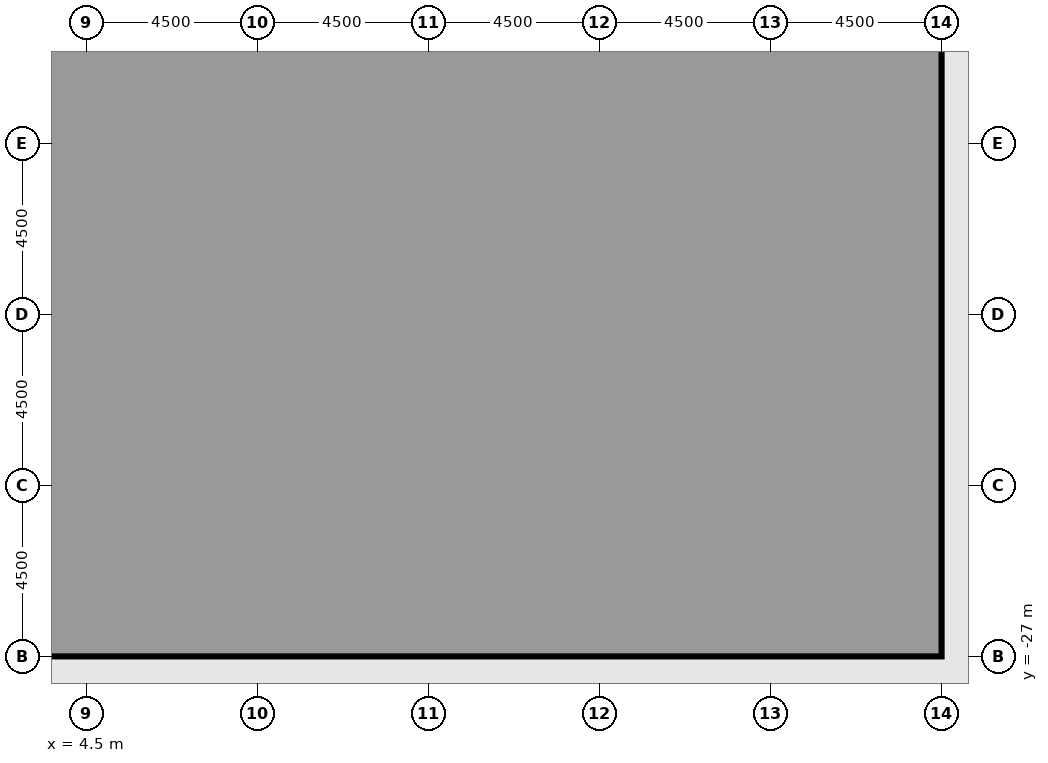
"""IFC4 building model, lengths in metres.
Left out: names, types, materials, properties, quantities, classifications, styles, units other than length and angle.
Written with IfcOpenShell. Run it as: python <this file> out.ifc"""

import sys

from ifc_helpers import new_model, si_unit, direction, frame, frame_2d, origin, origin_2d, place, context, subcontext, project, spatial, rectangle, extrude, element, fill, save


model = new_model("IFC4")
c1 = context("Model", 3, precision=1e-05, world=origin(), true_north=direction((0.0, 1.0)))
c2 = subcontext(c1, "Body", "Model", "MODEL_VIEW")
j1 = project(units=[si_unit("LENGTHUNIT", "METRE"), si_unit("PLANEANGLEUNIT", "RADIAN")], contexts=[c1])
p1 = place(None, origin())
s1 = spatial("IfcSite", under=j1, at=p1, CompositionType="ELEMENT")
p2 = place(p1, origin())
s2 = spatial("IfcBuilding", under=s1, at=p2, CompositionType="ELEMENT")
p3 = place(p2, frame((0.0, 0.0, 7.2)))
s3 = spatial("IfcBuildingStorey", under=s2, at=p3, CompositionType="ELEMENT", Elevation=7.2)
for number, where, z_axis, x_axis in (
    (1, (4.5, -27.0, -0.45), (0.0, 0.0, 1.0), (1.0, 0.0, 0.0)),
    (2, (9.0, -27.0, -0.45), (0.0, 0.0, 1.0), (1.0, 0.0, 0.0)),
    (3, (13.5, -27.0, -0.45), (0.0, 0.0, 1.0), (1.0, 0.0, 0.0)),
    (4, (18.0, -27.0, -0.45), (0.0, 0.0, 1.0), (1.0, 0.0, 0.0)),
    (5, (22.5, -27.0, -0.45), (0.0, 0.0, 1.0), (1.0, 0.0, 0.0)),
    (6, (27.0, -22.5, -0.45), (0.0, 0.0, 1.0), (1.0, 0.0, 0.0)),
    (7, (27.0, -18.0, -0.45), (0.0, 0.0, 1.0), (1.0, 0.0, 0.0)),
    (8, (27.0, -13.5, -0.45), (0.0, 0.0, 1.0), (1.0, 0.0, 0.0)),
):
    element("IfcColumn", number, at=place(p3, frame(where, z_axis=z_axis, x_axis=x_axis)), inside=s3, PredefinedType="COLUMN", context=c2, shape_type="SweptSolid", body=[
        extrude(rectangle(XDim=1.4, YDim=1.4, at=origin_2d()), origin(), (0.0, 0.0, 1.0), 4.55),
    ])
for number, where, z_axis, x_axis in (
    (9, (9.0, -18.0, 0.0), (0.0, 0.0, 1.0), (1.0, 0.0, 0.0)),
    (10, (18.0, -18.0, 0.0), (0.0, 0.0, 1.0), (1.0, 0.0, 0.0)),
    (11, (22.5, -18.0, 0.0), (0.0, 0.0, 1.0), (1.0, 0.0, 0.0)),
):
    element("IfcColumn", number, at=place(p3, frame(where, z_axis=z_axis, x_axis=x_axis)), inside=s3, PredefinedType="COLUMN", context=c2, shape_type="SweptSolid", body=[
        extrude(rectangle(XDim=1.6, YDim=1.6, at=origin_2d()), origin(), (0.0, 0.0, 1.0), 4.1),
    ])
p4 = place(p3, frame((3.8, -27.0, 0.0), z_axis=(0.0, 0.0, 1.0), x_axis=(-1.0, 0.0, 0.0)))
e12 = element("IfcWall", 12, at=p4, inside=s3, PredefinedType="SOLIDWALL", context=c2, shape_type="SweptSolid", body=[
    extrude(rectangle(XDim=3.1, YDim=0.3, at=frame_2d((1.55, 0.0))), origin(), (0.0, 0.0, 1.0), 2.75),
])
p5 = place(p4, frame((0.35, 0.0, 0.8)))
e13 = element("IfcOpeningElement", 13, at=p5, cuts=e12, PredefinedType="OPENING", context=c2, shape_type="SweptSolid", body=[
    extrude(rectangle(XDim=2.4, YDim=1.7, at=frame_2d((1.2, 0.85))), frame((0.0, 0.16, 0.0), z_axis=(0.0, -1.0, 0.0), x_axis=(1.0, 0.0, 0.0)), (0.0, 0.0, 1.0), 0.32),
])
p6 = place(p3, frame((8.3, -27.0, 0.0), z_axis=(0.0, 0.0, 1.0), x_axis=(-1.0, 0.0, 0.0)))
e14 = element("IfcWall", 14, at=p6, inside=s3, PredefinedType="SOLIDWALL", context=c2, shape_type="SweptSolid", body=[
    extrude(rectangle(XDim=3.1, YDim=0.3, at=frame_2d((1.55, 0.0))), origin(), (0.0, 0.0, 1.0), 2.75),
])
p7 = place(p6, frame((0.35, 0.0, 0.8)))
e15 = element("IfcOpeningElement", 15, at=p7, cuts=e14, PredefinedType="OPENING", context=c2, shape_type="SweptSolid", body=[
    extrude(rectangle(XDim=2.4, YDim=1.7, at=frame_2d((1.2, 0.85))), frame((0.0, 0.16, 0.0), z_axis=(0.0, -1.0, 0.0), x_axis=(1.0, 0.0, 0.0)), (0.0, 0.0, 1.0), 0.32),
])
p8 = place(p3, frame((12.8, -27.0, 0.0), z_axis=(0.0, 0.0, 1.0), x_axis=(-1.0, 0.0, 0.0)))
e16 = element("IfcWall", 16, at=p8, inside=s3, PredefinedType="SOLIDWALL", context=c2, shape_type="SweptSolid", body=[
    extrude(rectangle(XDim=3.1, YDim=0.3, at=frame_2d((1.55, 0.0))), origin(), (0.0, 0.0, 1.0), 2.75),
])
p9 = place(p8, frame((0.35, 0.0, 0.8)))
e17 = element("IfcOpeningElement", 17, at=p9, cuts=e16, PredefinedType="OPENING", context=c2, shape_type="SweptSolid", body=[
    extrude(rectangle(XDim=2.4, YDim=1.7, at=frame_2d((1.2, 0.85))), frame((0.0, 0.16, 0.0), z_axis=(0.0, -1.0, 0.0), x_axis=(1.0, 0.0, 0.0)), (0.0, 0.0, 1.0), 0.32),
])
p10 = place(p3, frame((17.3, -27.0, 0.0), z_axis=(0.0, 0.0, 1.0), x_axis=(-1.0, 0.0, 0.0)))
e18 = element("IfcWall", 18, at=p10, inside=s3, PredefinedType="SOLIDWALL", context=c2, shape_type="SweptSolid", body=[
    extrude(rectangle(XDim=3.1, YDim=0.3, at=frame_2d((1.55, 0.0))), origin(), (0.0, 0.0, 1.0), 2.75),
])
p11 = place(p10, frame((1.05, 0.0, 0.0)))
e19 = element("IfcOpeningElement", 19, at=p11, cuts=e18, PredefinedType="OPENING", context=c2, shape_type="SweptSolid", body=[
    extrude(rectangle(XDim=1.0, YDim=2.2, at=frame_2d((0.5, 1.1))), frame((0.0, 0.16, 0.0), z_axis=(0.0, -1.0, 0.0), x_axis=(1.0, 0.0, 0.0)), (0.0, 0.0, 1.0), 0.32),
])
p12 = place(p3, frame((21.8, -27.0, 0.0), z_axis=(0.0, 0.0, 1.0), x_axis=(-1.0, 0.0, 0.0)))
e20 = element("IfcWall", 20, at=p12, inside=s3, PredefinedType="SOLIDWALL", context=c2, shape_type="SweptSolid", body=[
    extrude(rectangle(XDim=3.1, YDim=0.3, at=frame_2d((1.55, 0.0))), origin(), (0.0, 0.0, 1.0), 2.75),
])
p13 = place(p12, frame((0.35, 0.0, 0.8)))
e21 = element("IfcOpeningElement", 21, at=p13, cuts=e20, PredefinedType="OPENING", context=c2, shape_type="SweptSolid", body=[
    extrude(rectangle(XDim=2.4, YDim=1.7, at=frame_2d((1.2, 0.85))), frame((0.0, 0.16, 0.0), z_axis=(0.0, -1.0, 0.0), x_axis=(1.0, 0.0, 0.0)), (0.0, 0.0, 1.0), 0.32),
])
p14 = place(p3, frame((26.406, -23.094, 0.0), z_axis=(0.0, 0.0, 1.0), x_axis=(-0.707106781187, -0.707106781187, 0.0)))
e22 = element("IfcWall", 22, at=p14, inside=s3, PredefinedType="SOLIDWALL", context=c2, shape_type="SweptSolid", body=[
    extrude(rectangle(XDim=4.684, YDim=0.3, at=frame_2d((2.342, 0.0))), origin(), (0.0, 0.0, 1.0), 2.75),
])
p15 = place(p14, frame((1.142, 0.0, 0.8)))
e23 = element("IfcOpeningElement", 23, at=p15, cuts=e22, PredefinedType="OPENING", context=c2, shape_type="SweptSolid", body=[
    extrude(rectangle(XDim=2.4, YDim=1.7, at=frame_2d((1.2, 0.85))), frame((0.0, 0.16, 0.0), z_axis=(0.0, -1.0, 0.0), x_axis=(1.0, 0.0, 0.0)), (0.0, 0.0, 1.0), 0.32),
])
p16 = place(p3, frame((27.0, -18.7, 0.0), z_axis=(0.0, 0.0, 1.0), x_axis=(0.0, -1.0, 0.0)))
e24 = element("IfcWall", 24, at=p16, inside=s3, PredefinedType="SOLIDWALL", context=c2, shape_type="SweptSolid", body=[
    extrude(rectangle(XDim=3.1, YDim=0.3, at=frame_2d((1.55, 0.0))), origin(), (0.0, 0.0, 1.0), 2.75),
])
p17 = place(p16, frame((0.35, 0.0, 0.8)))
e25 = element("IfcOpeningElement", 25, at=p17, cuts=e24, PredefinedType="OPENING", context=c2, shape_type="SweptSolid", body=[
    extrude(rectangle(XDim=2.4, YDim=1.7, at=frame_2d((1.2, 0.85))), frame((0.0, 0.16, 0.0), z_axis=(0.0, -1.0, 0.0), x_axis=(1.0, 0.0, 0.0)), (0.0, 0.0, 1.0), 0.32),
])
p18 = place(p3, frame((27.0, -14.2, 0.0), z_axis=(0.0, 0.0, 1.0), x_axis=(0.0, -1.0, 0.0)))
e26 = element("IfcWall", 26, at=p18, inside=s3, PredefinedType="SOLIDWALL", context=c2, shape_type="SweptSolid", body=[
    extrude(rectangle(XDim=3.1, YDim=0.3, at=frame_2d((1.55, 0.0))), origin(), (0.0, 0.0, 1.0), 2.75),
])
p19 = place(p18, frame((1.05, 0.0, 0.0)))
e27 = element("IfcOpeningElement", 27, at=p19, cuts=e26, PredefinedType="OPENING", context=c2, shape_type="SweptSolid", body=[
    extrude(rectangle(XDim=1.0, YDim=2.2, at=frame_2d((0.5, 1.1))), frame((0.0, 0.16, 0.0), z_axis=(0.0, -1.0, 0.0), x_axis=(1.0, 0.0, 0.0)), (0.0, 0.0, 1.0), 0.32),
])
p20 = place(p3, frame((27.0, -9.7, 0.0), z_axis=(0.0, 0.0, 1.0), x_axis=(0.0, -1.0, 0.0)))
e28 = element("IfcWall", 28, at=p20, inside=s3, PredefinedType="SOLIDWALL", context=c2, shape_type="SweptSolid", body=[
    extrude(rectangle(XDim=3.1, YDim=0.3, at=frame_2d((1.55, 0.0))), origin(), (0.0, 0.0, 1.0), 2.75),
])
p21 = place(p20, frame((0.475, 0.0, 0.8)))
e29 = element("IfcOpeningElement", 29, at=p21, cuts=e28, PredefinedType="OPENING", context=c2, shape_type="SweptSolid", body=[
    extrude(rectangle(XDim=1.2, YDim=1.7, at=frame_2d((0.6, 0.85))), frame((0.0, 0.16, 0.0), z_axis=(0.0, -1.0, 0.0), x_axis=(1.0, 0.0, 0.0)), (0.0, 0.0, 1.0), 0.32),
])
for number, where, z_axis, x_axis in (
    (30, (4.5, -26.3, 0.0), (0.0, 0.0, 1.0), (0.0, 1.0, 0.0)),
    (31, (13.5, -26.3, 0.0), (0.0, 0.0, 1.0), (0.0, 1.0, 0.0)),
):
    element("IfcWall", number, at=place(p3, frame(where, z_axis=z_axis, x_axis=x_axis)), inside=s3, PredefinedType="PARTITIONING", context=c2, shape_type="SweptSolid", body=[
        extrude(rectangle(XDim=14.3, YDim=0.2, at=frame_2d((7.15, 0.0))), origin(), (0.0, 0.0, 1.0), 3.65),
    ])
p22 = place(p3, frame((18.0, -26.3, 0.0), z_axis=(0.0, 0.0, 1.0), x_axis=(0.0, 1.0, 0.0)))
e32 = element("IfcWall", 32, at=p22, inside=s3, PredefinedType="PARTITIONING", context=c2, shape_type="SweptSolid", body=[
    extrude(rectangle(XDim=7.5, YDim=0.2, at=frame_2d((3.75, 0.0))), origin(), (0.0, 0.0, 1.0), 3.65),
])
p23 = place(p3, frame((18.0, -17.2, 0.0), z_axis=(0.0, 0.0, 1.0), x_axis=(0.0, 1.0, 0.0)))
e33 = element("IfcWall", 33, at=p23, inside=s3, PredefinedType="PARTITIONING", context=c2, shape_type="SweptSolid", body=[
    extrude(rectangle(XDim=5.2, YDim=0.2, at=frame_2d((2.6, 0.0))), origin(), (0.0, 0.0, 1.0), 3.65),
])
p24 = place(p3, frame((8.2, -18.3, 0.0), z_axis=(0.0, 0.0, 1.0), x_axis=(-1.0, 0.0, 0.0)))
e34 = element("IfcWall", 34, at=p24, inside=s3, PredefinedType="PARTITIONING", context=c2, shape_type="SweptSolid", body=[
    extrude(rectangle(XDim=7.4, YDim=0.15, at=frame_2d((3.7, 0.0))), origin(), (0.0, 0.0, 1.0), 3.65),
])
p25 = place(p24, frame((6.1, 0.0, 0.0)))
e35 = element("IfcOpeningElement", 35, at=p25, cuts=e34, PredefinedType="OPENING", context=c2, shape_type="SweptSolid", body=[
    extrude(rectangle(XDim=1.0, YDim=2.1, at=frame_2d((0.5, 1.05))), frame((0.0, 0.085, 0.0), z_axis=(0.0, -1.0, 0.0), x_axis=(1.0, 0.0, 0.0)), (0.0, 0.0, 1.0), 0.17),
])
p26 = place(p24, frame((0.1, 0.0, 0.0)))
e36 = element("IfcOpeningElement", 36, at=p26, cuts=e34, PredefinedType="OPENING", context=c2, shape_type="SweptSolid", body=[
    extrude(rectangle(XDim=1.0, YDim=2.1, at=frame_2d((0.5, 1.05))), frame((0.0, 0.085, 0.0), z_axis=(0.0, -1.0, 0.0), x_axis=(1.0, 0.0, 0.0)), (0.0, 0.0, 1.0), 0.17),
])
p27 = place(p3, frame((17.2, -18.3, 0.0), z_axis=(0.0, 0.0, 1.0), x_axis=(-1.0, 0.0, 0.0)))
e37 = element("IfcWall", 37, at=p27, inside=s3, PredefinedType="PARTITIONING", context=c2, shape_type="SweptSolid", body=[
    extrude(rectangle(XDim=7.4, YDim=0.15, at=frame_2d((3.7, 0.0))), origin(), (0.0, 0.0, 1.0), 3.65),
])
p28 = place(p27, frame((0.85, 0.0, 0.0)))
e38 = element("IfcOpeningElement", 38, at=p28, cuts=e37, PredefinedType="OPENING", context=c2, shape_type="SweptSolid", body=[
    extrude(rectangle(XDim=1.0, YDim=2.1, at=frame_2d((0.5, 1.05))), frame((0.0, 0.085, 0.0), z_axis=(0.0, -1.0, 0.0), x_axis=(1.0, 0.0, 0.0)), (0.0, 0.0, 1.0), 0.17),
])
p29 = place(p3, frame((21.7, -18.3, 0.0), z_axis=(0.0, 0.0, 1.0), x_axis=(-1.0, 0.0, 0.0)))
e39 = element("IfcWall", 39, at=p29, inside=s3, PredefinedType="PARTITIONING", context=c2, shape_type="SweptSolid", body=[
    extrude(rectangle(XDim=2.9, YDim=0.15, at=frame_2d((1.45, 0.0))), origin(), (0.0, 0.0, 1.0), 3.65),
])
p30 = place(p29, frame((0.1, 0.0, 0.0)))
e40 = element("IfcOpeningElement", 40, at=p30, cuts=e39, PredefinedType="OPENING", context=c2, shape_type="SweptSolid", body=[
    extrude(rectangle(XDim=1.0, YDim=2.1, at=frame_2d((0.5, 1.05))), frame((0.0, 0.085, 0.0), z_axis=(0.0, -1.0, 0.0), x_axis=(1.0, 0.0, 0.0)), (0.0, 0.0, 1.0), 0.17),
])
p31 = place(p3, frame((23.3, -18.3, 0.0), z_axis=(0.0, 0.0, 1.0), x_axis=(1.0, 0.0, 0.0)))
e41 = element("IfcWall", 41, at=p31, inside=s3, PredefinedType="PARTITIONING", context=c2, shape_type="SweptSolid", body=[
    extrude(rectangle(XDim=3.0, YDim=0.15, at=frame_2d((1.5, 0.0))), origin(), (0.0, 0.0, 1.0), 3.65),
])
p32 = place(p3, frame((26.85, -12.0, 0.0), z_axis=(0.0, 0.0, 1.0), x_axis=(-1.0, 0.0, 0.0)))
e42 = element("IfcWall", 42, at=p32, inside=s3, PredefinedType="PARTITIONING", context=c2, shape_type="SweptSolid", body=[
    extrude(rectangle(XDim=53.7, YDim=0.2, at=frame_2d((26.85, 0.0))), origin(), (0.0, 0.0, 1.0), 3.65),
])
p33 = place(p32, frame((47.75, 0.0, 0.0)))
e43 = element("IfcOpeningElement", 43, at=p33, cuts=e42, PredefinedType="OPENING", context=c2, shape_type="SweptSolid", body=[
    extrude(rectangle(XDim=1.0, YDim=2.1, at=frame_2d((0.5, 1.05))), frame((0.0, 0.11, 0.0), z_axis=(0.0, -1.0, 0.0), x_axis=(1.0, 0.0, 0.0)), (0.0, 0.0, 1.0), 0.22),
])
p34 = place(p32, frame((35.75, 0.0, 0.0)))
e44 = element("IfcOpeningElement", 44, at=p34, cuts=e42, PredefinedType="OPENING", context=c2, shape_type="SweptSolid", body=[
    extrude(rectangle(XDim=1.0, YDim=2.1, at=frame_2d((0.5, 1.05))), frame((0.0, 0.11, 0.0), z_axis=(0.0, -1.0, 0.0), x_axis=(1.0, 0.0, 0.0)), (0.0, 0.0, 1.0), 0.22),
])
p35 = place(p32, frame((25.5, 0.0, 0.0)))
e45 = element("IfcOpeningElement", 45, at=p35, cuts=e42, PredefinedType="OPENING", context=c2, shape_type="SweptSolid", body=[
    extrude(rectangle(XDim=1.0, YDim=2.1, at=frame_2d((0.5, 1.05))), frame((0.0, 0.11, 0.0), z_axis=(0.0, -1.0, 0.0), x_axis=(1.0, 0.0, 0.0)), (0.0, 0.0, 1.0), 0.22),
])
p36 = place(p32, frame((18.25, 0.0, 0.0)))
e46 = element("IfcOpeningElement", 46, at=p36, cuts=e42, PredefinedType="OPENING", context=c2, shape_type="SweptSolid", body=[
    extrude(rectangle(XDim=1.0, YDim=2.1, at=frame_2d((0.5, 1.05))), frame((0.0, 0.11, 0.0), z_axis=(0.0, -1.0, 0.0), x_axis=(1.0, 0.0, 0.0)), (0.0, 0.0, 1.0), 0.22),
])
p37 = place(p32, frame((10.25, 0.0, 0.0)))
e47 = element("IfcOpeningElement", 47, at=p37, cuts=e42, PredefinedType="OPENING", context=c2, shape_type="SweptSolid", body=[
    extrude(rectangle(XDim=1.0, YDim=2.1, at=frame_2d((0.5, 1.05))), frame((0.0, 0.11, 0.0), z_axis=(0.0, -1.0, 0.0), x_axis=(1.0, 0.0, 0.0)), (0.0, 0.0, 1.0), 0.22),
])
p38 = place(p32, frame((3.0, 0.0, 0.0)))
e48 = element("IfcOpeningElement", 48, at=p38, cuts=e42, PredefinedType="OPENING", context=c2, shape_type="SweptSolid", body=[
    extrude(rectangle(XDim=1.0, YDim=2.1, at=frame_2d((0.5, 1.05))), frame((0.0, 0.11, 0.0), z_axis=(0.0, -1.0, 0.0), x_axis=(1.0, 0.0, 0.0)), (0.0, 0.0, 1.0), 0.22),
])
p39 = place(p7, origin())
e49 = element("IfcWindow", 49, at=p39, inside=s3, PartitioningType="SINGLE_PANEL", PredefinedType="WINDOW", context=c2, shape_type="SweptSolid", body=[
    extrude(rectangle(XDim=2.4, YDim=1.7, at=frame_2d((1.2, 0.85))), frame((0.0, 0.03, 0.0), z_axis=(0.0, -1.0, 0.0), x_axis=(1.0, 0.0, 0.0)), (0.0, 0.0, 1.0), 0.06),
])
fill(e15, e49)
p40 = place(p9, origin())
e50 = element("IfcWindow", 50, at=p40, inside=s3, PartitioningType="SINGLE_PANEL", PredefinedType="WINDOW", context=c2, shape_type="SweptSolid", body=[
    extrude(rectangle(XDim=2.4, YDim=1.7, at=frame_2d((1.2, 0.85))), frame((0.0, 0.03, 0.0), z_axis=(0.0, -1.0, 0.0), x_axis=(1.0, 0.0, 0.0)), (0.0, 0.0, 1.0), 0.06),
])
fill(e17, e50)
p41 = place(p11, origin())
e51 = element("IfcDoor", 51, at=p41, inside=s3, OperationType="SINGLE_SWING_RIGHT", PredefinedType="DOOR", context=c2, shape_type="SweptSolid", body=[
    extrude(rectangle(XDim=1.0, YDim=2.2, at=frame_2d((0.5, 1.1))), frame((0.0, 0.025, 0.0), z_axis=(0.0, -1.0, 0.0), x_axis=(1.0, 0.0, 0.0)), (0.0, 0.0, 1.0), 0.05),
])
fill(e19, e51)
p42 = place(p13, origin())
e52 = element("IfcWindow", 52, at=p42, inside=s3, PartitioningType="SINGLE_PANEL", PredefinedType="WINDOW", context=c2, shape_type="SweptSolid", body=[
    extrude(rectangle(XDim=2.4, YDim=1.7, at=frame_2d((1.2, 0.85))), frame((0.0, 0.03, 0.0), z_axis=(0.0, -1.0, 0.0), x_axis=(1.0, 0.0, 0.0)), (0.0, 0.0, 1.0), 0.06),
])
fill(e21, e52)
p43 = place(p15, origin())
e53 = element("IfcWindow", 53, at=p43, inside=s3, PartitioningType="SINGLE_PANEL", PredefinedType="WINDOW", context=c2, shape_type="SweptSolid", body=[
    extrude(rectangle(XDim=2.4, YDim=1.7, at=frame_2d((1.2, 0.85))), frame((0.0, 0.03, 0.0), z_axis=(0.0, -1.0, 0.0), x_axis=(1.0, 0.0, 0.0)), (0.0, 0.0, 1.0), 0.06),
])
fill(e23, e53)
p44 = place(p17, origin())
e54 = element("IfcWindow", 54, at=p44, inside=s3, PartitioningType="SINGLE_PANEL", PredefinedType="WINDOW", context=c2, shape_type="SweptSolid", body=[
    extrude(rectangle(XDim=2.4, YDim=1.7, at=frame_2d((1.2, 0.85))), frame((0.0, 0.03, 0.0), z_axis=(0.0, -1.0, 0.0), x_axis=(1.0, 0.0, 0.0)), (0.0, 0.0, 1.0), 0.06),
])
fill(e25, e54)
p45 = place(p19, origin())
e55 = element("IfcDoor", 55, at=p45, inside=s3, OperationType="SINGLE_SWING_LEFT", PredefinedType="DOOR", context=c2, shape_type="SweptSolid", body=[
    extrude(rectangle(XDim=1.0, YDim=2.2, at=frame_2d((0.5, 1.1))), frame((0.0, 0.025, 0.0), z_axis=(0.0, -1.0, 0.0), x_axis=(1.0, 0.0, 0.0)), (0.0, 0.0, 1.0), 0.05),
])
fill(e27, e55)
p46 = place(p21, origin())
e56 = element("IfcWindow", 56, at=p46, inside=s3, PartitioningType="SINGLE_PANEL", PredefinedType="WINDOW", context=c2, shape_type="SweptSolid", body=[
    extrude(rectangle(XDim=1.2, YDim=1.7, at=frame_2d((0.6, 0.85))), frame((0.0, 0.03, 0.0), z_axis=(0.0, -1.0, 0.0), x_axis=(1.0, 0.0, 0.0)), (0.0, 0.0, 1.0), 0.06),
])
fill(e29, e56)
p47 = place(p26, origin())
e57 = element("IfcDoor", 57, at=p47, inside=s3, OperationType="SINGLE_SWING_LEFT", PredefinedType="DOOR", context=c2, shape_type="SweptSolid", body=[
    extrude(rectangle(XDim=1.0, YDim=2.1, at=frame_2d((0.5, 1.05))), frame((0.0, 0.025, 0.0), z_axis=(0.0, -1.0, 0.0), x_axis=(1.0, 0.0, 0.0)), (0.0, 0.0, 1.0), 0.05),
])
fill(e36, e57)
p48 = place(p28, origin())
e58 = element("IfcDoor", 58, at=p48, inside=s3, OperationType="SINGLE_SWING_LEFT", PredefinedType="DOOR", context=c2, shape_type="SweptSolid", body=[
    extrude(rectangle(XDim=1.0, YDim=2.1, at=frame_2d((0.5, 1.05))), frame((0.0, 0.025, 0.0), z_axis=(0.0, -1.0, 0.0), x_axis=(1.0, 0.0, 0.0)), (0.0, 0.0, 1.0), 0.05),
])
fill(e38, e58)
p49 = place(p30, origin())
e59 = element("IfcDoor", 59, at=p49, inside=s3, OperationType="SINGLE_SWING_LEFT", PredefinedType="DOOR", context=c2, shape_type="SweptSolid", body=[
    extrude(rectangle(XDim=1.0, YDim=2.1, at=frame_2d((0.5, 1.05))), frame((0.0, 0.025, 0.0), z_axis=(0.0, -1.0, 0.0), x_axis=(1.0, 0.0, 0.0)), (0.0, 0.0, 1.0), 0.05),
])
fill(e40, e59)
p50 = place(p36, origin())
e60 = element("IfcDoor", 60, at=p50, inside=s3, OperationType="SINGLE_SWING_LEFT", PredefinedType="DOOR", context=c2, shape_type="SweptSolid", body=[
    extrude(rectangle(XDim=1.0, YDim=2.1, at=frame_2d((0.5, 1.05))), frame((0.0, 0.025, 0.0), z_axis=(0.0, -1.0, 0.0), x_axis=(1.0, 0.0, 0.0)), (0.0, 0.0, 1.0), 0.05),
])
fill(e46, e60)
p51 = place(p37, origin())
e61 = element("IfcDoor", 61, at=p51, inside=s3, OperationType="SINGLE_SWING_LEFT", PredefinedType="DOOR", context=c2, shape_type="SweptSolid", body=[
    extrude(rectangle(XDim=1.0, YDim=2.1, at=frame_2d((0.5, 1.05))), frame((0.0, 0.025, 0.0), z_axis=(0.0, -1.0, 0.0), x_axis=(1.0, 0.0, 0.0)), (0.0, 0.0, 1.0), 0.05),
])
fill(e47, e61)
p52 = place(p38, origin())
e62 = element("IfcDoor", 62, at=p52, inside=s3, OperationType="SINGLE_SWING_LEFT", PredefinedType="DOOR", context=c2, shape_type="SweptSolid", body=[
    extrude(rectangle(XDim=1.0, YDim=2.1, at=frame_2d((0.5, 1.05))), frame((0.0, 0.025, 0.0), z_axis=(0.0, -1.0, 0.0), x_axis=(1.0, 0.0, 0.0)), (0.0, 0.0, 1.0), 0.05),
])
fill(e48, e62)
save(model, sys.argv[1])
